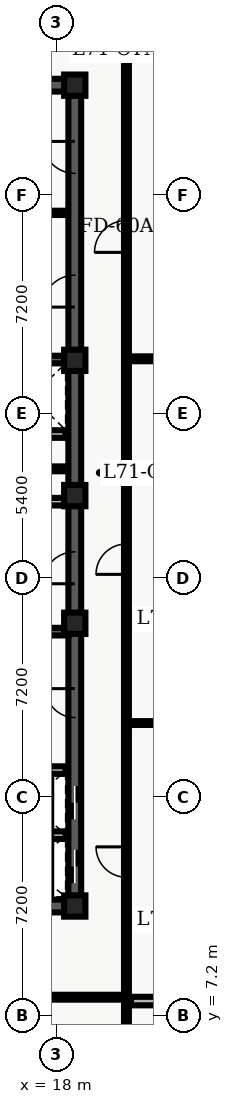
"""IFC4 building model, lengths in metres.
Left out: names, types, materials, properties, quantities, classifications, styles, units other than length and angle.
Written with IfcOpenShell. Run it as: python <this file> out.ifc"""

import sys

from ifc_helpers import new_model, entity, si_unit, converted_unit, direction, frame, origin_with_axes, origin_2d_with_axis, place, context, subcontext, project, spatial, polyline, rectangle, outline, extrude, element, fill, save


model = new_model("IFC4")
c1 = context("Model", 3, precision=1e-05, world=origin_with_axes(), true_north=direction((0.0, 1.0)))
c2 = subcontext(c1, "Body", "Model", "MODEL_VIEW")
j1 = project(units=[si_unit("LENGTHUNIT", "METRE"), converted_unit("PLANEANGLEUNIT", "DEGREE", entity("IfcPlaneAngleMeasure", 0.017), si_unit("PLANEANGLEUNIT", "RADIAN"), dimensions=[0, 0, 0, 0, 0, 0, 0])], contexts=[c1])
p1 = place(None, origin_with_axes())
s1 = spatial("IfcSite", under=j1, at=p1, CompositionType="ELEMENT")
p2 = place(p1, origin_with_axes())
s2 = spatial("IfcBuilding", under=s1, at=p2, CompositionType="ELEMENT")
p3 = place(p2, frame((0.0, 0.0, 288.0), z_axis=(0.0, 0.0, 1.0), x_axis=(1.0, 0.0, 0.0)))
s3 = spatial("IfcBuildingStorey", under=s2, at=p3, CompositionType="ELEMENT", Elevation=288.0)
p4 = place(p3, frame((11.4, 10.8, 0.0), z_axis=(0.0, 0.0, 1.0), x_axis=(1.0, 0.0, 0.0)))
e1 = element("IfcWall", 1, at=p4, inside=s3, PredefinedType="SHEAR", context=c2, shape_type="SweptSolid", body=[
    extrude(outline(polyline([(0.0, -0.21), (7.2, -0.21), (7.2, 0.21), (0.0, 0.21), (0.0, -0.21)])), origin_with_axes(), (0.0, 0.0, 1.0), 3.66),
])
p5 = place(p4, frame((2.625, 0.0, 0.0), z_axis=(0.0, 0.0, 1.0), x_axis=(1.0, 0.0, 0.0)))
e2 = element("IfcOpeningElement", 2, at=p5, cuts=e1, PredefinedType="OPENING", context=c2, shape_type="SweptSolid", body=[
    extrude(rectangle(XDim=1.05, YDim=0.44, at=origin_2d_with_axis()), origin_with_axes(), (0.0, 0.0, 1.0), 2.15),
])
p6 = place(p3, frame((11.4, 37.8, 0.0), z_axis=(0.0, 0.0, 1.0), x_axis=(1.0, 0.0, 0.0)))
e3 = element("IfcWall", 3, at=p6, inside=s3, PredefinedType="SHEAR", context=c2, shape_type="SweptSolid", body=[
    extrude(outline(polyline([(0.0, -0.21), (7.2, -0.21), (7.2, 0.21), (0.0, 0.21), (0.0, -0.21)])), origin_with_axes(), (0.0, 0.0, 1.0), 3.66),
])
p7 = place(p6, frame((2.625, 0.0, 0.0), z_axis=(0.0, 0.0, 1.0), x_axis=(1.0, 0.0, 0.0)))
e4 = element("IfcOpeningElement", 4, at=p7, cuts=e3, PredefinedType="OPENING", context=c2, shape_type="SweptSolid", body=[
    extrude(rectangle(XDim=1.05, YDim=0.44, at=origin_2d_with_axis()), origin_with_axes(), (0.0, 0.0, 1.0), 2.15),
])
p8 = place(p3, frame((18.6, 10.8, 0.0), z_axis=(0.0, 0.0, 1.0), x_axis=(0.0, 1.0, 0.0)))
e5 = element("IfcWall", 5, at=p8, inside=s3, PredefinedType="SHEAR", context=c2, shape_type="SweptSolid", body=[
    extrude(outline(polyline([(0.0, -0.21), (13.5, -0.21), (13.5, 0.21), (0.0, 0.21), (0.0, -0.21)])), origin_with_axes(), (0.0, 0.0, 1.0), 3.66),
])
p9 = place(p8, frame((1.3, 0.0, 0.0), z_axis=(0.0, 0.0, 1.0), x_axis=(1.0, 0.0, 0.0)))
e6 = element("IfcOpeningElement", 6, at=p9, cuts=e5, PredefinedType="OPENING", context=c2, shape_type="SweptSolid", body=[
    extrude(rectangle(XDim=1.1, YDim=0.44, at=origin_2d_with_axis()), origin_with_axes(), (0.0, 0.0, 1.0), 2.15),
])
p10 = place(p8, frame((3.4, 0.0, 0.0), z_axis=(0.0, 0.0, 1.0), x_axis=(1.0, 0.0, 0.0)))
e7 = element("IfcOpeningElement", 7, at=p10, cuts=e5, PredefinedType="OPENING", context=c2, shape_type="SweptSolid", body=[
    extrude(rectangle(XDim=1.1, YDim=0.44, at=origin_2d_with_axis()), origin_with_axes(), (0.0, 0.0, 1.0), 2.15),
])
p11 = place(p8, frame((11.125, 0.0, 0.0), z_axis=(0.0, 0.0, 1.0), x_axis=(1.0, 0.0, 0.0)))
e8 = element("IfcOpeningElement", 8, at=p11, cuts=e5, PredefinedType="OPENING", context=c2, shape_type="SweptSolid", body=[
    extrude(rectangle(XDim=1.05, YDim=0.44, at=origin_2d_with_axis()), origin_with_axes(), (0.0, 0.0, 1.0), 2.15),
])
p12 = place(p8, frame((6.675, 0.0, 0.0), z_axis=(0.0, 0.0, 1.0), x_axis=(1.0, 0.0, 0.0)))
e9 = element("IfcOpeningElement", 9, at=p12, cuts=e5, PredefinedType="OPENING", context=c2, shape_type="SweptSolid", body=[
    extrude(rectangle(XDim=0.95, YDim=0.44, at=origin_2d_with_axis()), origin_with_axes(), (0.0, 0.0, 1.0), 2.15),
])
p13 = place(p3, frame((18.6, 24.3, 0.0), z_axis=(0.0, 0.0, 1.0), x_axis=(0.0, 1.0, 0.0)))
e10 = element("IfcWall", 10, at=p13, inside=s3, PredefinedType="SHEAR", context=c2, shape_type="SweptSolid", body=[
    extrude(outline(polyline([(0.0, -0.21), (13.5, -0.21), (13.5, 0.21), (0.0, 0.21), (0.0, -0.21)])), origin_with_axes(), (0.0, 0.0, 1.0), 3.66),
])
p14 = place(p13, frame((6.725, 0.0, 0.0), z_axis=(0.0, 0.0, 1.0), x_axis=(1.0, 0.0, 0.0)))
e11 = element("IfcOpeningElement", 11, at=p14, cuts=e10, PredefinedType="OPENING", context=c2, shape_type="SweptSolid", body=[
    extrude(rectangle(XDim=1.05, YDim=0.44, at=origin_2d_with_axis()), origin_with_axes(), (0.0, 0.0, 1.0), 2.15),
])
p15 = place(p13, frame((11.125, 0.0, 0.0), z_axis=(0.0, 0.0, 1.0), x_axis=(1.0, 0.0, 0.0)))
e12 = element("IfcOpeningElement", 12, at=p15, cuts=e10, PredefinedType="OPENING", context=c2, shape_type="SweptSolid", body=[
    extrude(rectangle(XDim=1.05, YDim=0.44, at=origin_2d_with_axis()), origin_with_axes(), (0.0, 0.0, 1.0), 2.15),
])
for number, where, z_axis, x_axis in (
    (13, (11.61, 19.825, 0.0), (0.0, 0.0, 1.0), (1.0, 0.0, 0.0)),
    (14, (11.61, 28.775, 0.0), (0.0, 0.0, 1.0), (1.0, 0.0, 0.0)),
):
    element("IfcWall", number, at=place(p3, frame(where, z_axis=z_axis, x_axis=x_axis)), inside=s3, PredefinedType="SHEAR", context=c2, shape_type="SweptSolid", body=[
        extrude(outline(polyline([(0.0, -0.125), (6.78, -0.125), (6.78, 0.125), (0.0, 0.125), (0.0, -0.125)])), origin_with_axes(), (0.0, 0.0, 1.0), 3.66),
    ])
p16 = place(p3, frame((11.7, 24.1, 0.0), z_axis=(0.0, 0.0, 1.0), x_axis=(1.0, 0.0, 0.0)))
e15 = element("IfcWall", 15, at=p16, inside=s3, PredefinedType="SOLIDWALL", context=c2, shape_type="SweptSolid", body=[
    extrude(outline(polyline([(0.0, -0.125), (6.6, -0.125), (6.6, 0.125), (0.0, 0.125), (0.0, -0.125)])), origin_with_axes(), (0.0, 0.0, 1.0), 2.7),
])
p17 = place(p16, frame((3.75, 0.0, 0.0), z_axis=(0.0, 0.0, 1.0), x_axis=(1.0, 0.0, 0.0)))
e16 = element("IfcOpeningElement", 16, at=p17, cuts=e15, PredefinedType="OPENING", context=c2, shape_type="SweptSolid", body=[
    extrude(rectangle(XDim=0.9, YDim=0.27, at=origin_2d_with_axis()), origin_with_axes(), (0.0, 0.0, 1.0), 2.15),
])
p18 = place(p3, frame((11.7, 26.325, 0.0), z_axis=(0.0, 0.0, 1.0), x_axis=(1.0, 0.0, 0.0)))
e17 = element("IfcWall", 17, at=p18, inside=s3, PredefinedType="SOLIDWALL", context=c2, shape_type="SweptSolid", body=[
    extrude(outline(polyline([(0.0, -0.125), (6.6, -0.125), (6.6, 0.125), (0.0, 0.125), (0.0, -0.125)])), origin_with_axes(), (0.0, 0.0, 1.0), 2.7),
])
p19 = place(p18, frame((3.5, 0.0, 0.0), z_axis=(0.0, 0.0, 1.0), x_axis=(1.0, 0.0, 0.0)))
e18 = element("IfcOpeningElement", 18, at=p19, cuts=e17, PredefinedType="OPENING", context=c2, shape_type="SweptSolid", body=[
    extrude(rectangle(XDim=0.9, YDim=0.27, at=origin_2d_with_axis()), origin_with_axes(), (0.0, 0.0, 1.0), 2.15),
])
for number, where, z_axis, x_axis in (
    (19, (18.6, 10.8, 0.0), (0.0, 0.0, 1.0), (1.0, 0.0, 0.0)),
    (20, (18.6, 20.1, 0.0), (0.0, 0.0, 1.0), (1.0, 0.0, 0.0)),
    (21, (18.6, 24.3, 0.0), (0.0, 0.0, 1.0), (1.0, 0.0, 0.0)),
    (22, (18.6, 28.75, 0.0), (0.0, 0.0, 1.0), (1.0, 0.0, 0.0)),
    (23, (18.6, 37.8, 0.0), (0.0, 0.0, 1.0), (1.0, 0.0, 0.0)),
):
    element("IfcColumn", number, at=place(p3, frame(where, z_axis=z_axis, x_axis=x_axis)), inside=s3, PredefinedType="COLUMN", context=c2, shape_type="SweptSolid", body=[
        extrude(rectangle(XDim=0.7, YDim=0.7, at=origin_2d_with_axis()), origin_with_axes(), (0.0, 0.0, 1.0), 3.9),
    ])
p20 = place(p3, frame((14.62, 25.18, 0.0), z_axis=(0.0, 0.0, 1.0), x_axis=(1.0, 0.0, 0.0)))
e24 = element("IfcWall", 24, at=p20, inside=s3, PredefinedType="PARTITIONING", context=c2, shape_type="SweptSolid", body=[
    extrude(outline(polyline([(0.0, -0.08), (3.68, -0.08), (3.68, 0.08), (0.0, 0.08), (0.0, -0.08)])), origin_with_axes(), (0.0, 0.0, 1.0), 2.7),
])
p21 = place(p20, frame((1.95, 0.0, 0.0), z_axis=(0.0, 0.0, 1.0), x_axis=(1.0, 0.0, 0.0)))
e25 = element("IfcOpeningElement", 25, at=p21, cuts=e24, PredefinedType="OPENING", context=c2, shape_type="SweptSolid", body=[
    extrude(rectangle(XDim=0.9, YDim=0.18, at=origin_2d_with_axis()), origin_with_axes(), (0.0, 0.0, 1.0), 2.15),
])
for number, where, z_axis, x_axis in (
    (26, (15.84, 13.13, 0.0), (0.0, 0.0, 1.0), (1.0, 0.0, 0.0)),
    (27, (15.84, 15.27, 0.0), (0.0, 0.0, 1.0), (1.0, 0.0, 0.0)),
):
    element("IfcWall", number, at=place(p3, frame(where, z_axis=z_axis, x_axis=x_axis)), inside=s3, PredefinedType="SOLIDWALL", context=c2, shape_type="SweptSolid", body=[
        extrude(outline(polyline([(0.0, -0.125), (2.46, -0.125), (2.46, 0.125), (0.0, 0.125), (0.0, -0.125)])), origin_with_axes(), (0.0, 0.0, 1.0), 2.7),
    ])
p22 = place(p3, frame((15.84, 33.6, 0.0), z_axis=(0.0, 0.0, 1.0), x_axis=(1.0, 0.0, 0.0)))
e28 = element("IfcWall", 28, at=p22, inside=s3, PredefinedType="PARTITIONING", context=c2, shape_type="SweptSolid", body=[
    extrude(outline(polyline([(0.0, -0.07), (2.46, -0.07), (2.46, 0.07), (0.0, 0.07), (0.0, -0.07)])), origin_with_axes(), (0.0, 0.0, 1.0), 2.7),
])
p23 = place(p3, frame((8.135, 7.8, 0.0), z_axis=(0.0, 0.0, 1.0), x_axis=(1.0, 0.0, 0.0)))
e29 = element("IfcWall", 29, at=p23, inside=s3, PredefinedType="PARTITIONING", context=c2, shape_type="SweptSolid", body=[
    extrude(outline(polyline([(0.0, -0.08), (12.165, -0.08), (12.165, 0.08), (0.0, 0.08), (0.0, -0.08)])), origin_with_axes(), (0.0, 0.0, 1.0), 2.7),
])
p24 = place(p23, frame((3.982, 0.0, 0.0), z_axis=(0.0, 0.0, 1.0), x_axis=(1.0, 0.0, 0.0)))
e30 = element("IfcOpeningElement", 30, at=p24, cuts=e29, PredefinedType="OPENING", context=c2, shape_type="SweptSolid", body=[
    extrude(rectangle(XDim=1.0, YDim=0.18, at=origin_2d_with_axis()), origin_with_axes(), (0.0, 0.0, 1.0), 2.15),
])
p25 = place(p23, frame((8.782, 0.0, 0.0), z_axis=(0.0, 0.0, 1.0), x_axis=(1.0, 0.0, 0.0)))
e31 = element("IfcOpeningElement", 31, at=p25, cuts=e29, PredefinedType="OPENING", context=c2, shape_type="SweptSolid", body=[
    extrude(rectangle(XDim=1.0, YDim=0.18, at=origin_2d_with_axis()), origin_with_axes(), (0.0, 0.0, 1.0), 2.15),
])
p26 = place(p3, frame((20.3, 0.335, 0.0), z_axis=(0.0, 0.0, 1.0), x_axis=(0.0, 1.0, 0.0)))
e32 = element("IfcWall", 32, at=p26, inside=s3, PredefinedType="PARTITIONING", context=c2, shape_type="SweptSolid", body=[
    extrude(outline(polyline([(0.0, -0.08), (40.165, -0.08), (40.165, 0.08), (0.0, 0.08), (0.0, -0.08)])), origin_with_axes(), (0.0, 0.0, 1.0), 2.7),
])
p27 = place(p26, frame((32.49, 0.0, 0.0), z_axis=(0.0, 0.0, 1.0), x_axis=(1.0, 0.0, 0.0)))
e33 = element("IfcOpeningElement", 33, at=p27, cuts=e32, PredefinedType="OPENING", context=c2, shape_type="SweptSolid", body=[
    extrude(rectangle(XDim=1.05, YDim=0.18, at=origin_2d_with_axis()), origin_with_axes(), (0.0, 0.0, 1.0), 2.15),
])
p28 = place(p26, frame((4.537, 0.0, 0.0), z_axis=(0.0, 0.0, 1.0), x_axis=(1.0, 0.0, 0.0)))
e34 = element("IfcOpeningElement", 34, at=p28, cuts=e32, PredefinedType="OPENING", context=c2, shape_type="SweptSolid", body=[
    extrude(rectangle(XDim=1.0, YDim=0.18, at=origin_2d_with_axis()), origin_with_axes(), (0.0, 0.0, 1.0), 2.15),
])
p29 = place(p26, frame((11.911, 0.0, 0.0), z_axis=(0.0, 0.0, 1.0), x_axis=(1.0, 0.0, 0.0)))
e35 = element("IfcOpeningElement", 35, at=p29, cuts=e32, PredefinedType="OPENING", context=c2, shape_type="SweptSolid", body=[
    extrude(rectangle(XDim=1.0, YDim=0.18, at=origin_2d_with_axis()), origin_with_axes(), (0.0, 0.0, 1.0), 2.15),
])
p30 = place(p26, frame((21.874, 0.0, 0.0), z_axis=(0.0, 0.0, 1.0), x_axis=(1.0, 0.0, 0.0)))
e36 = element("IfcOpeningElement", 36, at=p30, cuts=e32, PredefinedType="OPENING", context=c2, shape_type="SweptSolid", body=[
    extrude(rectangle(XDim=1.0, YDim=0.18, at=origin_2d_with_axis()), origin_with_axes(), (0.0, 0.0, 1.0), 2.15),
])
p31 = place(p3, frame((20.3, 28.8, 0.0), z_axis=(0.0, 0.0, 1.0), x_axis=(1.0, 0.0, 0.0)))
e37 = element("IfcWall", 37, at=p31, inside=s3, PredefinedType="PARTITIONING", context=c2, shape_type="SweptSolid", body=[
    extrude(outline(polyline([(0.0, -0.08), (3.32, -0.08), (3.32, 0.08), (0.0, 0.08), (0.0, -0.08)])), origin_with_axes(), (0.0, 0.0, 1.0), 2.7),
])
p32 = place(p3, frame((20.45, 7.673, 0.0), z_axis=(0.0, 0.0, 1.0), x_axis=(1.0, 0.0, 0.0)))
e38 = element("IfcWall", 38, at=p32, inside=s3, PredefinedType="PARTITIONING", context=c2, shape_type="SweptSolid", body=[
    extrude(outline(polyline([(0.0, -0.14), (13.415, -0.14), (13.415, 0.14), (0.0, 0.14), (0.0, -0.14)])), origin_with_axes(), (0.0, 0.0, 1.0), 2.7),
])
p33 = place(p3, frame((20.45, 16.818, 0.0), z_axis=(0.0, 0.0, 1.0), x_axis=(1.0, 0.0, 0.0)))
e39 = element("IfcWall", 39, at=p33, inside=s3, PredefinedType="PARTITIONING", context=c2, shape_type="SweptSolid", body=[
    extrude(outline(polyline([(0.0, -0.062), (13.415, -0.062), (13.415, 0.062), (0.0, 0.062), (0.0, -0.062)])), origin_with_axes(), (0.0, 0.0, 1.0), 2.7),
])
p34 = place(p8, frame((1.3, 0.0, 0.0), z_axis=(0.0, 0.0, 1.0), x_axis=(1.0, 0.0, 0.0)))
e40 = element("IfcDoor", 40, at=p34, inside=s3, OperationType="SLIDING_TO_LEFT", PredefinedType="DOOR", context=c2, shape_type="SweptSolid", body=[
    extrude(rectangle(XDim=1.1, YDim=0.09, at=origin_2d_with_axis()), origin_with_axes(), (0.0, 0.0, 1.0), 2.15),
])
fill(e6, e40)
p35 = place(p8, frame((3.4, 0.0, 0.0), z_axis=(0.0, 0.0, 1.0), x_axis=(1.0, 0.0, 0.0)))
e41 = element("IfcDoor", 41, at=p35, inside=s3, OperationType="SLIDING_TO_RIGHT", PredefinedType="DOOR", context=c2, shape_type="SweptSolid", body=[
    extrude(rectangle(XDim=1.1, YDim=0.09, at=origin_2d_with_axis()), origin_with_axes(), (0.0, 0.0, 1.0), 2.15),
])
fill(e7, e41)
p36 = place(p8, frame((11.125, 0.0, 0.0), z_axis=(0.0, 0.0, 1.0), x_axis=(1.0, 0.0, 0.0)))
e42 = element("IfcDoor", 42, at=p36, inside=s3, OperationType="SINGLE_SWING_LEFT", PredefinedType="DOOR", context=c2, shape_type="SweptSolid", body=[
    extrude(rectangle(XDim=1.05, YDim=0.09, at=origin_2d_with_axis()), origin_with_axes(), (0.0, 0.0, 1.0), 2.15),
])
fill(e8, e42)
p37 = place(p8, frame((6.675, 0.0, 0.0), z_axis=(0.0, 0.0, 1.0), x_axis=(1.0, 0.0, 0.0)))
e43 = element("IfcDoor", 43, at=p37, inside=s3, OperationType="SINGLE_SWING_RIGHT", PredefinedType="DOOR", context=c2, shape_type="SweptSolid", body=[
    extrude(rectangle(XDim=0.95, YDim=0.09, at=origin_2d_with_axis()), origin_with_axes(), (0.0, 0.0, 1.0), 2.15),
])
fill(e9, e43)
p38 = place(p13, frame((6.725, 0.0, 0.0), z_axis=(0.0, 0.0, 1.0), x_axis=(1.0, 0.0, 0.0)))
e44 = element("IfcDoor", 44, at=p38, inside=s3, OperationType="SINGLE_SWING_LEFT", PredefinedType="DOOR", context=c2, shape_type="SweptSolid", body=[
    extrude(rectangle(XDim=1.05, YDim=0.09, at=origin_2d_with_axis()), origin_with_axes(), (0.0, 0.0, 1.0), 2.15),
])
fill(e11, e44)
p39 = place(p13, frame((11.125, 0.0, 0.0), z_axis=(0.0, 0.0, 1.0), x_axis=(1.0, 0.0, 0.0)))
e45 = element("IfcDoor", 45, at=p39, inside=s3, OperationType="SINGLE_SWING_RIGHT", PredefinedType="DOOR", context=c2, shape_type="SweptSolid", body=[
    extrude(rectangle(XDim=1.05, YDim=0.09, at=origin_2d_with_axis()), origin_with_axes(), (0.0, 0.0, 1.0), 2.15),
])
fill(e12, e45)
p40 = place(p26, frame((32.49, 0.0, 0.0), z_axis=(0.0, 0.0, 1.0), x_axis=(1.0, 0.0, 0.0)))
e46 = element("IfcDoor", 46, at=p40, inside=s3, OperationType="SINGLE_SWING_LEFT", PredefinedType="DOOR", context=c2, shape_type="SweptSolid", body=[
    extrude(rectangle(XDim=1.05, YDim=0.09, at=origin_2d_with_axis()), origin_with_axes(), (0.0, 0.0, 1.0), 2.15),
])
fill(e33, e46)
p41 = place(p26, frame((11.911, 0.0, 0.0), z_axis=(0.0, 0.0, 1.0), x_axis=(1.0, 0.0, 0.0)))
e47 = element("IfcDoor", 47, at=p41, inside=s3, OperationType="SINGLE_SWING_RIGHT", PredefinedType="DOOR", context=c2, shape_type="SweptSolid", body=[
    extrude(rectangle(XDim=1.0, YDim=0.09, at=origin_2d_with_axis()), origin_with_axes(), (0.0, 0.0, 1.0), 2.15),
])
fill(e35, e47)
p42 = place(p26, frame((21.874, 0.0, 0.0), z_axis=(0.0, 0.0, 1.0), x_axis=(1.0, 0.0, 0.0)))
e48 = element("IfcDoor", 48, at=p42, inside=s3, OperationType="SINGLE_SWING_LEFT", PredefinedType="DOOR", context=c2, shape_type="SweptSolid", body=[
    extrude(rectangle(XDim=1.0, YDim=0.09, at=origin_2d_with_axis()), origin_with_axes(), (0.0, 0.0, 1.0), 2.15),
])
fill(e36, e48)
save(model, sys.argv[1])
